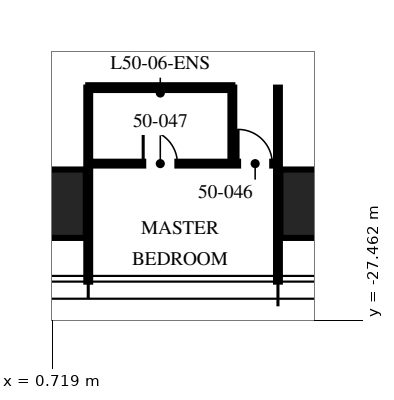
"""IFC4 building model, lengths in metres.
Left out: names, types, materials, properties, quantities, classifications, styles, units other than length and angle.
Written with IfcOpenShell. Run it as: python <this file> out.ifc"""

import sys

from ifc_helpers import new_model, si_unit, direction, frame, frame_2d, origin, origin_2d, place, context, subcontext, project, spatial, rectangle, hollow_rectangle, extrude, element, fill, save


model = new_model("IFC4")
c1 = context("Model", 3, precision=1e-05, world=origin(), true_north=direction((0.0, 1.0)))
c2 = subcontext(c1, "Body", "Model", "MODEL_VIEW")
j1 = project(units=[si_unit("LENGTHUNIT", "METRE"), si_unit("PLANEANGLEUNIT", "RADIAN")], contexts=[c1])
p1 = place(None, origin())
s1 = spatial("IfcSite", under=j1, at=p1, CompositionType="ELEMENT")
p2 = place(p1, origin())
s2 = spatial("IfcBuilding", under=s1, at=p2, CompositionType="ELEMENT")
p3 = place(p2, frame((0.0, 0.0, 203.25)))
s3 = spatial("IfcBuildingStorey", under=s2, at=p3, CompositionType="ELEMENT", Elevation=203.25)
for number, where, z_axis, x_axis in (
    (1, (8.32, -24.4, 0.0), (0.0, 0.0, 1.0), (1.0, 0.0, 0.0)),
    (2, (0.0, -24.4, 0.0), (0.0, 0.0, 1.0), (1.0, 0.0, 0.0)),
):
    element("IfcColumn", number, at=place(p3, frame(where, z_axis=z_axis, x_axis=x_axis)), inside=s3, PredefinedType="COLUMN", context=c2, shape_type="SweptSolid", body=[
        extrude(hollow_rectangle(XDim=3.2, YDim=1.8, WallThickness=0.2, at=origin_2d()), origin(), (0.0, 0.0, 1.0), 3.75),
    ])
for number, where, z_axis, x_axis in (
    (3, (1.664, -21.345, 0.0), (0.0, 0.0, 1.0), (0.0, -1.0, 0.0)),
    (4, (6.656, -21.345, 0.0), (0.0, 0.0, 1.0), (0.0, -1.0, 0.0)),
):
    element("IfcWall", number, at=place(p3, frame(where, z_axis=z_axis, x_axis=x_axis)), inside=s3, PredefinedType="PARTITIONING", context=c2, shape_type="SweptSolid", body=[
        extrude(rectangle(XDim=5.105, YDim=0.1, at=frame_2d((2.552, 0.0))), origin(), (0.0, 0.0, 1.0), 2.91),
    ])
p4 = place(p3, frame((1.664, -23.345, 0.0), z_axis=(0.0, 0.0, 1.0), x_axis=(1.0, 0.0, 0.0)))
e5 = element("IfcWall", 5, at=p4, inside=s3, PredefinedType="PARTITIONING", context=c2, shape_type="SweptSolid", body=[
    extrude(rectangle(XDim=4.992, YDim=0.1, at=frame_2d((2.496, 0.0))), origin(), (0.0, 0.0, 1.0), 2.81),
])
p5 = place(p4, frame((3.942, 0.0, 0.0)))
e6 = element("IfcOpeningElement", 6, at=p5, cuts=e5, PredefinedType="OPENING", context=c2, shape_type="SweptSolid", body=[
    extrude(rectangle(XDim=0.9, YDim=2.1, at=frame_2d((0.45, 1.05))), frame((0.0, 0.06, 0.0), z_axis=(0.0, -1.0, 0.0), x_axis=(1.0, 0.0, 0.0)), (0.0, 0.0, 1.0), 0.12),
])
p6 = place(p4, frame((1.446, 0.0, 0.0)))
e7 = element("IfcOpeningElement", 7, at=p6, cuts=e5, PredefinedType="OPENING", context=c2, shape_type="SweptSolid", body=[
    extrude(rectangle(XDim=0.9, YDim=2.1, at=frame_2d((0.45, 1.05))), frame((0.0, 0.06, 0.0), z_axis=(0.0, -1.0, 0.0), x_axis=(1.0, 0.0, 0.0)), (0.0, 0.0, 1.0), 0.12),
])
p7 = place(p3, frame((5.456, -21.345, 0.0), z_axis=(0.0, 0.0, 1.0), x_axis=(0.0, -1.0, 0.0)))
e8 = element("IfcWall", 8, at=p7, inside=s3, PredefinedType="PARTITIONING", context=c2, shape_type="SweptSolid", body=[
    extrude(rectangle(XDim=2.0, YDim=0.1, at=frame_2d((1.0, 0.0))), origin(), (0.0, 0.0, 1.0), 3.5),
])
p8 = place(p3, frame((1.664, -21.345, 0.0), z_axis=(0.0, 0.0, 1.0), x_axis=(1.0, 0.0, 0.0)))
e9 = element("IfcWall", 9, at=p8, inside=s3, PredefinedType="PARTITIONING", context=c2, shape_type="SweptSolid", body=[
    extrude(rectangle(XDim=3.792, YDim=0.125, at=frame_2d((1.896, 0.0))), origin(), (0.0, 0.0, 1.0), 2.81),
])
p9 = place(p5, origin())
e10 = element("IfcDoor", 10, at=p9, inside=s3, OperationType="SINGLE_SWING_LEFT", PredefinedType="DOOR", context=c2, shape_type="SweptSolid", body=[
    extrude(rectangle(XDim=0.9, YDim=2.1, at=frame_2d((0.45, 1.05))), frame((0.0, 0.025, 0.0), z_axis=(0.0, -1.0, 0.0), x_axis=(1.0, 0.0, 0.0)), (0.0, 0.0, 1.0), 0.05),
])
fill(e6, e10)
p10 = place(p6, origin())
e11 = element("IfcDoor", 11, at=p10, inside=s3, OperationType="SINGLE_SWING_LEFT", PredefinedType="DOOR", context=c2, shape_type="SweptSolid", body=[
    extrude(rectangle(XDim=0.9, YDim=2.1, at=frame_2d((0.45, 1.05))), frame((0.0, 0.025, 0.0), z_axis=(0.0, -1.0, 0.0), x_axis=(1.0, 0.0, 0.0)), (0.0, 0.0, 1.0), 0.05),
])
fill(e7, e11)
save(model, sys.argv[1])
